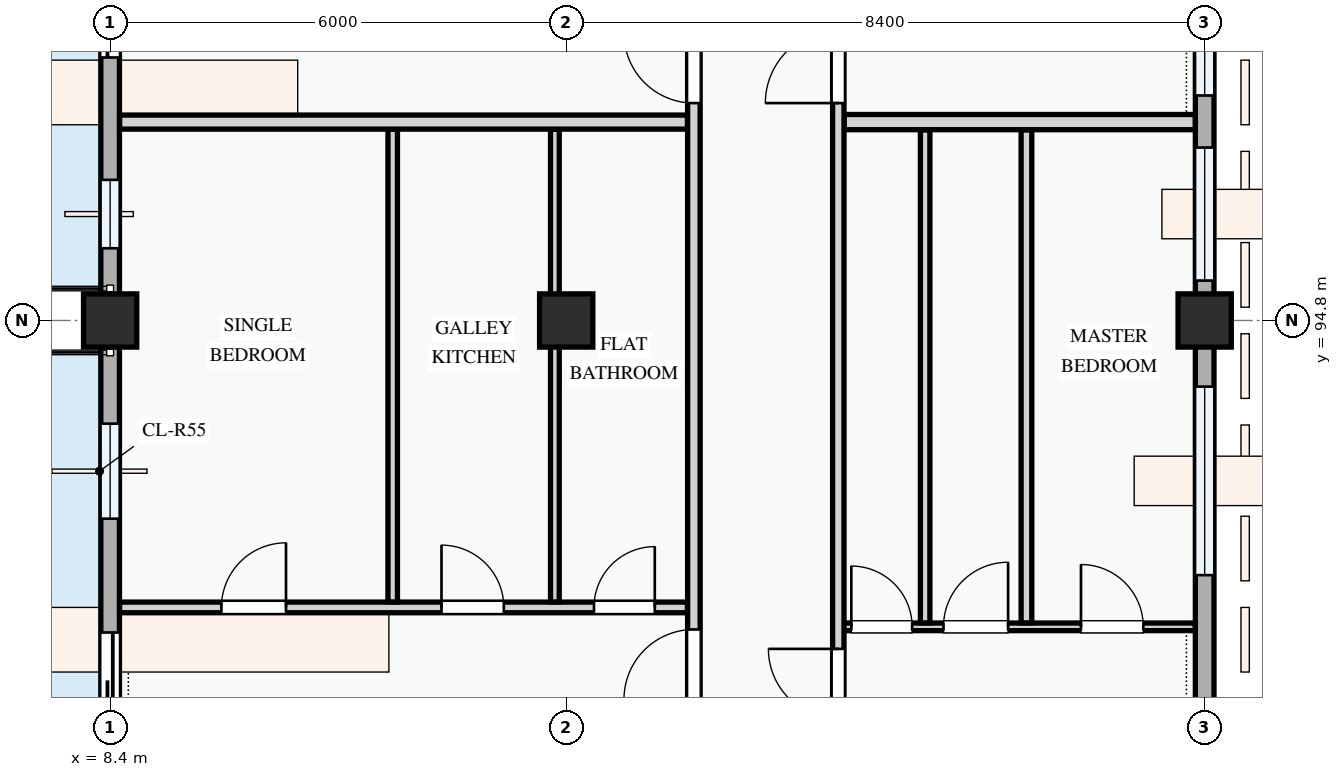
"""IFC4 building model, lengths in metres.
Left out: names, types, materials, properties, quantities, classifications, styles, units other than length and angle.
Written with IfcOpenShell. Run it as: python <this file> out.ifc"""

import sys

from ifc_helpers import new_model, si_unit, direction, frame, frame_2d, origin, origin_2d, place, context, subcontext, project, spatial, rectangle, extrude, element, fill, save


model = new_model("IFC4")
c1 = context("Model", 3, precision=1e-05, world=origin(), true_north=direction((0.0, 1.0)))
c2 = subcontext(c1, "Body", "Model", "MODEL_VIEW")
j1 = project(units=[si_unit("LENGTHUNIT", "METRE"), si_unit("PLANEANGLEUNIT", "RADIAN")], contexts=[c1])
p1 = place(None, origin())
s1 = spatial("IfcSite", under=j1, at=p1, CompositionType="ELEMENT")
p2 = place(p1, origin())
s2 = spatial("IfcBuilding", under=s1, at=p2, CompositionType="ELEMENT")
p3 = place(p2, frame((0.0, 0.0, 8.1)))
s3 = spatial("IfcBuildingStorey", under=s2, at=p3, CompositionType="ELEMENT", Elevation=8.1)
for number, where, z_axis, x_axis in (
    (1, (8.4, 94.8, 0.0), (0.0, 0.0, 1.0), (1.0, 0.0, 0.0)),
    (2, (14.4, 94.8, 0.0), (0.0, 0.0, 1.0), (1.0, 0.0, 0.0)),
    (3, (22.8, 94.8, 0.0), (0.0, 0.0, 1.0), (1.0, 0.0, 0.0)),
):
    element("IfcColumn", number, at=place(p3, frame(where, z_axis=z_axis, x_axis=x_axis)), inside=s3, PredefinedType="COLUMN", context=c2, shape_type="SweptSolid", body=[
        extrude(rectangle(XDim=0.7, YDim=0.7, at=origin_2d()), origin(), (0.0, 0.0, 1.0), 3.3),
    ])
p4 = place(p3, frame((8.4, 100.8, 0.0), z_axis=(0.0, 0.0, 1.0), x_axis=(0.0, -1.0, 0.0)))
e4 = element("IfcWall", 4, at=p4, inside=s3, PredefinedType="STANDARD", context=c2, shape_type="SweptSolid", body=[
    extrude(rectangle(XDim=6.0, YDim=0.245, at=frame_2d((3.0, 0.0))), origin(), (0.0, 0.0, 1.0), 2.445),
])
p5 = place(p4, frame((1.14, 0.0, 0.0)))
e5 = element("IfcOpeningElement", 5, at=p5, cuts=e4, PredefinedType="OPENING", context=c2, shape_type="SweptSolid", body=[
    extrude(rectangle(XDim=1.4, YDim=2.2, at=frame_2d((0.7, 1.1))), frame((0.0, 0.133, 0.0), z_axis=(0.0, -1.0, 0.0), x_axis=(1.0, 0.0, 0.0)), (0.0, 0.0, 1.0), 0.265),
])
p6 = place(p4, frame((4.15, 0.0, 0.78)))
e6 = element("IfcOpeningElement", 6, at=p6, cuts=e4, PredefinedType="OPENING", context=c2, shape_type="SweptSolid", body=[
    extrude(rectangle(XDim=0.9, YDim=1.2, at=frame_2d((0.45, 0.6))), frame((0.0, 0.133, 0.0), z_axis=(0.0, -1.0, 0.0), x_axis=(1.0, 0.0, 0.0)), (0.0, 0.0, 1.0), 0.265),
])
p7 = place(p3, frame((8.4, 94.8, 0.0), z_axis=(0.0, 0.0, 1.0), x_axis=(0.0, -1.0, 0.0)))
e7 = element("IfcWall", 7, at=p7, inside=s3, PredefinedType="STANDARD", context=c2, shape_type="SweptSolid", body=[
    extrude(rectangle(XDim=8.4, YDim=0.245, at=frame_2d((4.2, 0.0))), origin(), (0.0, 0.0, 1.0), 2.345),
])
p8 = place(p7, frame((4.105, 0.0, 0.0)))
e8 = element("IfcOpeningElement", 8, at=p8, cuts=e7, PredefinedType="OPENING", context=c2, shape_type="SweptSolid", body=[
    extrude(rectangle(XDim=1.5, YDim=2.2, at=frame_2d((0.75, 1.1))), frame((0.0, 0.133, 0.0), z_axis=(0.0, -1.0, 0.0), x_axis=(1.0, 0.0, 0.0)), (0.0, 0.0, 1.0), 0.265),
])
p9 = place(p7, frame((1.357, 0.0, 0.78)))
e9 = element("IfcOpeningElement", 9, at=p9, cuts=e7, PredefinedType="OPENING", context=c2, shape_type="SweptSolid", body=[
    extrude(rectangle(XDim=1.25, YDim=1.3, at=frame_2d((0.625, 0.65))), frame((0.0, 0.133, 0.0), z_axis=(0.0, -1.0, 0.0), x_axis=(1.0, 0.0, 0.0)), (0.0, 0.0, 1.0), 0.265),
])
p10 = place(p7, frame((6.022, 0.0, 0.78)))
e10 = element("IfcOpeningElement", 10, at=p10, cuts=e7, PredefinedType="OPENING", context=c2, shape_type="SweptSolid", body=[
    extrude(rectangle(XDim=1.82, YDim=1.46, at=frame_2d((0.91, 0.73))), frame((0.0, 0.133, 0.0), z_axis=(0.0, -1.0, 0.0), x_axis=(1.0, 0.0, 0.0)), (0.0, 0.0, 1.0), 0.265),
])
p11 = place(p3, frame((22.8, 86.4, 0.0), z_axis=(0.0, 0.0, 1.0), x_axis=(0.0, 1.0, 0.0)))
e11 = element("IfcWall", 11, at=p11, inside=s3, PredefinedType="STANDARD", context=c2, shape_type="SweptSolid", body=[
    extrude(rectangle(XDim=8.4, YDim=0.245, at=frame_2d((4.2, 0.0))), origin(), (0.0, 0.0, 1.0), 2.425),
])
p12 = place(p11, frame((1.16, 0.0, 0.78)))
e12 = element("IfcOpeningElement", 12, at=p12, cuts=e11, PredefinedType="OPENING", context=c2, shape_type="SweptSolid", body=[
    extrude(rectangle(XDim=2.24, YDim=1.52, at=frame_2d((1.12, 0.76))), frame((0.0, 0.133, 0.0), z_axis=(0.0, -1.0, 0.0), x_axis=(1.0, 0.0, 0.0)), (0.0, 0.0, 1.0), 0.265),
])
p13 = place(p11, frame((5.05, 0.0, 0.78)))
e13 = element("IfcOpeningElement", 13, at=p13, cuts=e11, PredefinedType="OPENING", context=c2, shape_type="SweptSolid", body=[
    extrude(rectangle(XDim=2.48, YDim=1.46, at=frame_2d((1.24, 0.73))), frame((0.0, 0.133, 0.0), z_axis=(0.0, -1.0, 0.0), x_axis=(1.0, 0.0, 0.0)), (0.0, 0.0, 1.0), 0.265),
])
p14 = place(p3, frame((22.8, 94.8, 0.0), z_axis=(0.0, 0.0, 1.0), x_axis=(0.0, 1.0, 0.0)))
e14 = element("IfcWall", 14, at=p14, inside=s3, PredefinedType="STANDARD", context=c2, shape_type="SweptSolid", body=[
    extrude(rectangle(XDim=6.0, YDim=0.245, at=frame_2d((3.0, 0.0))), origin(), (0.0, 0.0, 1.0), 2.575),
])
p15 = place(p14, frame((0.525, 0.0, 0.78)))
e15 = element("IfcOpeningElement", 15, at=p15, cuts=e14, PredefinedType="OPENING", context=c2, shape_type="SweptSolid", body=[
    extrude(rectangle(XDim=1.75, YDim=1.45, at=frame_2d((0.875, 0.725))), frame((0.0, 0.133, 0.0), z_axis=(0.0, -1.0, 0.0), x_axis=(1.0, 0.0, 0.0)), (0.0, 0.0, 1.0), 0.265),
])
p16 = place(p14, frame((2.96, 0.0, 0.78)))
e16 = element("IfcOpeningElement", 16, at=p16, cuts=e14, PredefinedType="OPENING", context=c2, shape_type="SweptSolid", body=[
    extrude(rectangle(XDim=2.5, YDim=1.6, at=frame_2d((1.25, 0.8))), frame((0.0, 0.133, 0.0), z_axis=(0.0, -1.0, 0.0), x_axis=(1.0, 0.0, 0.0)), (0.0, 0.0, 1.0), 0.265),
])
p17 = place(p3, frame((8.524, 91.025, 0.0), z_axis=(0.0, 0.0, 1.0), x_axis=(1.0, 0.0, 0.0)))
e17 = element("IfcWall", 17, at=p17, inside=s3, PredefinedType="PARTITIONING", context=c2, shape_type="SweptSolid", body=[
    extrude(rectangle(XDim=7.471, YDim=0.14, at=frame_2d((3.736, 0.0))), origin(), (0.0, 0.0, 1.0), 3.0),
])
p18 = place(p17, frame((1.339, 0.0, 0.0)))
e18 = element("IfcOpeningElement", 18, at=p18, cuts=e17, PredefinedType="OPENING", context=c2, shape_type="SweptSolid", body=[
    extrude(rectangle(XDim=0.85, YDim=2.1, at=frame_2d((0.425, 1.05))), frame((0.0, 0.08, 0.0), z_axis=(0.0, -1.0, 0.0), x_axis=(1.0, 0.0, 0.0)), (0.0, 0.0, 1.0), 0.16),
])
p19 = place(p17, frame((4.235, 0.0, 0.0)))
e19 = element("IfcOpeningElement", 19, at=p19, cuts=e17, PredefinedType="OPENING", context=c2, shape_type="SweptSolid", body=[
    extrude(rectangle(XDim=0.82, YDim=2.08, at=frame_2d((0.41, 1.04))), frame((0.0, 0.08, 0.0), z_axis=(0.0, -1.0, 0.0), x_axis=(1.0, 0.0, 0.0)), (0.0, 0.0, 1.0), 0.16),
])
p20 = place(p17, frame((6.241, 0.0, 0.0)))
e20 = element("IfcOpeningElement", 20, at=p20, cuts=e17, PredefinedType="OPENING", context=c2, shape_type="SweptSolid", body=[
    extrude(rectangle(XDim=0.8, YDim=2.1, at=frame_2d((0.4, 1.05))), frame((0.0, 0.08, 0.0), z_axis=(0.0, -1.0, 0.0), x_axis=(1.0, 0.0, 0.0)), (0.0, 0.0, 1.0), 0.16),
])
p21 = place(p3, frame((12.118, 91.097, 0.0), z_axis=(0.0, 0.0, 1.0), x_axis=(0.0, 1.0, 0.0)))
e21 = element("IfcWall", 21, at=p21, inside=s3, PredefinedType="PARTITIONING", context=c2, shape_type="SweptSolid", body=[
    extrude(rectangle(XDim=6.219, YDim=0.125, at=frame_2d((3.109, 0.0))), origin(), (0.0, 0.0, 1.0), 3.0),
])
p22 = place(p3, frame((14.251, 91.097, 0.0), z_axis=(0.0, 0.0, 1.0), x_axis=(0.0, 1.0, 0.0)))
e22 = element("IfcWall", 22, at=p22, inside=s3, PredefinedType="PARTITIONING", context=c2, shape_type="SweptSolid", body=[
    extrude(rectangle(XDim=6.219, YDim=0.115, at=frame_2d((3.109, 0.0))), origin(), (0.0, 0.0, 1.0), 2.425),
])
p23 = place(p3, frame((17.98, 90.77, 0.0), z_axis=(0.0, 0.0, 1.0), x_axis=(1.0, 0.0, 0.0)))
e23 = element("IfcWall", 23, at=p23, inside=s3, PredefinedType="PARTITIONING", context=c2, shape_type="SweptSolid", body=[
    extrude(rectangle(XDim=4.696, YDim=0.1, at=frame_2d((2.348, 0.0))), origin(), (0.0, 0.0, 1.0), 3.0),
])
p24 = place(p23, frame((0.171, 0.0, 0.0)))
e24 = element("IfcOpeningElement", 24, at=p24, cuts=e23, PredefinedType="OPENING", context=c2, shape_type="SweptSolid", body=[
    extrude(rectangle(XDim=0.8, YDim=2.1, at=frame_2d((0.4, 1.05))), frame((0.0, 0.06, 0.0), z_axis=(0.0, -1.0, 0.0), x_axis=(1.0, 0.0, 0.0)), (0.0, 0.0, 1.0), 0.12),
])
p25 = place(p23, frame((1.384, 0.0, 0.0)))
e25 = element("IfcOpeningElement", 25, at=p25, cuts=e23, PredefinedType="OPENING", context=c2, shape_type="SweptSolid", body=[
    extrude(rectangle(XDim=0.85, YDim=2.1, at=frame_2d((0.425, 1.05))), frame((0.0, 0.06, 0.0), z_axis=(0.0, -1.0, 0.0), x_axis=(1.0, 0.0, 0.0)), (0.0, 0.0, 1.0), 0.12),
])
p26 = place(p23, frame((3.193, 0.0, 0.0)))
e26 = element("IfcOpeningElement", 26, at=p26, cuts=e23, PredefinedType="OPENING", context=c2, shape_type="SweptSolid", body=[
    extrude(rectangle(XDim=0.82, YDim=2.08, at=frame_2d((0.41, 1.04))), frame((0.0, 0.06, 0.0), z_axis=(0.0, -1.0, 0.0), x_axis=(1.0, 0.0, 0.0)), (0.0, 0.0, 1.0), 0.12),
])
p27 = place(p3, frame((20.455, 90.822, 0.0), z_axis=(0.0, 0.0, 1.0), x_axis=(0.0, 1.0, 0.0)))
e27 = element("IfcWall", 27, at=p27, inside=s3, PredefinedType="PARTITIONING", context=c2, shape_type="SweptSolid", body=[
    extrude(rectangle(XDim=6.487, YDim=0.14, at=frame_2d((3.243, 0.0))), origin(), (0.0, 0.0, 1.0), 3.0),
])
p28 = place(p3, frame((19.122, 90.822, 0.0), z_axis=(0.0, 0.0, 1.0), x_axis=(0.0, 1.0, 0.0)))
e28 = element("IfcWall", 28, at=p28, inside=s3, PredefinedType="PARTITIONING", context=c2, shape_type="SweptSolid", body=[
    extrude(rectangle(XDim=6.487, YDim=0.125, at=frame_2d((3.243, 0.0))), origin(), (0.0, 0.0, 1.0), 3.0),
])
p29 = place(p3, frame((8.524, 97.41, 0.0), z_axis=(0.0, 0.0, 1.0), x_axis=(1.0, 0.0, 0.0)))
e29 = element("IfcWall", 29, at=p29, inside=s3, PredefinedType="PARTITIONING", context=c2, shape_type="SweptSolid", body=[
    extrude(rectangle(XDim=7.471, YDim=0.185, at=frame_2d((3.736, 0.0))), origin(), (0.0, 0.0, 1.0), 3.0),
])
p30 = place(p3, frame((18.057, 97.41, 0.0), z_axis=(0.0, 0.0, 1.0), x_axis=(1.0, 0.0, 0.0)))
e30 = element("IfcWall", 30, at=p30, inside=s3, PredefinedType="PARTITIONING", context=c2, shape_type="SweptSolid", body=[
    extrude(rectangle(XDim=4.619, YDim=0.2, at=frame_2d((2.309, 0.0))), origin(), (0.0, 0.0, 1.0), 3.0),
])
p31 = place(p3, frame((16.08, 72.125, 0.0), z_axis=(0.0, 0.0, 1.0), x_axis=(0.0, 1.0, 0.0)))
e31 = element("IfcWall", 31, at=p31, inside=s3, PredefinedType="PARTITIONING", context=c2, shape_type="SweptSolid", body=[
    extrude(rectangle(XDim=37.216, YDim=0.165, at=frame_2d((18.608, 0.0))), origin(), (0.0, 0.0, 1.0), 3.0),
])
p32 = place(p31, frame((3.657, 0.0, 0.0)))
e32 = element("IfcOpeningElement", 32, at=p32, cuts=e31, PredefinedType="OPENING", context=c2, shape_type="SweptSolid", body=[
    extrude(rectangle(XDim=0.96, YDim=2.12, at=frame_2d((0.48, 1.06))), frame((0.0, 0.093, 0.0), z_axis=(0.0, -1.0, 0.0), x_axis=(1.0, 0.0, 0.0)), (0.0, 0.0, 1.0), 0.185),
])
p33 = place(p31, frame((17.69, 0.0, 0.0)))
e33 = element("IfcOpeningElement", 33, at=p33, cuts=e31, PredefinedType="OPENING", context=c2, shape_type="SweptSolid", body=[
    extrude(rectangle(XDim=0.92, YDim=2.1, at=frame_2d((0.46, 1.05))), frame((0.0, 0.093, 0.0), z_axis=(0.0, -1.0, 0.0), x_axis=(1.0, 0.0, 0.0)), (0.0, 0.0, 1.0), 0.185),
])
p34 = place(p31, frame((25.535, 0.0, 0.0)))
e34 = element("IfcOpeningElement", 34, at=p34, cuts=e31, PredefinedType="OPENING", context=c2, shape_type="SweptSolid", body=[
    extrude(rectangle(XDim=0.92, YDim=2.1, at=frame_2d((0.46, 1.05))), frame((0.0, 0.093, 0.0), z_axis=(0.0, -1.0, 0.0), x_axis=(1.0, 0.0, 0.0)), (0.0, 0.0, 1.0), 0.185),
])
p35 = place(p3, frame((17.98, 72.125, 0.0), z_axis=(0.0, 0.0, 1.0), x_axis=(0.0, 1.0, 0.0)))
e35 = element("IfcWall", 35, at=p35, inside=s3, PredefinedType="PARTITIONING", context=c2, shape_type="SweptSolid", body=[
    extrude(rectangle(XDim=37.216, YDim=0.15, at=frame_2d((18.608, 0.0))), origin(), (0.0, 0.0, 1.0), 3.0),
])
p36 = place(p35, frame((3.619, 0.0, 0.0)))
e36 = element("IfcOpeningElement", 36, at=p36, cuts=e35, PredefinedType="OPENING", context=c2, shape_type="SweptSolid", body=[
    extrude(rectangle(XDim=0.92, YDim=2.1, at=frame_2d((0.46, 1.05))), frame((0.0, 0.085, 0.0), z_axis=(0.0, -1.0, 0.0), x_axis=(1.0, 0.0, 0.0)), (0.0, 0.0, 1.0), 0.17),
])
p37 = place(p35, frame((17.435, 0.0, 0.0)))
e37 = element("IfcOpeningElement", 37, at=p37, cuts=e35, PredefinedType="OPENING", context=c2, shape_type="SweptSolid", body=[
    extrude(rectangle(XDim=0.92, YDim=2.1, at=frame_2d((0.46, 1.05))), frame((0.0, 0.085, 0.0), z_axis=(0.0, -1.0, 0.0), x_axis=(1.0, 0.0, 0.0)), (0.0, 0.0, 1.0), 0.17),
])
p38 = place(p35, frame((25.535, 0.0, 0.0)))
e38 = element("IfcOpeningElement", 38, at=p38, cuts=e35, PredefinedType="OPENING", context=c2, shape_type="SweptSolid", body=[
    extrude(rectangle(XDim=0.96, YDim=2.12, at=frame_2d((0.48, 1.06))), frame((0.0, 0.085, 0.0), z_axis=(0.0, -1.0, 0.0), x_axis=(1.0, 0.0, 0.0)), (0.0, 0.0, 1.0), 0.17),
])
p39 = place(p5, frame((1.4, 0.0, 0.0), z_axis=(0.0, 0.0, 1.0), x_axis=(-1.0, 0.0, 0.0)))
e39 = element("IfcDoor", 39, at=p39, inside=s3, OperationType="SLIDING_TO_LEFT", PredefinedType="DOOR", context=c2, shape_type="SweptSolid", body=[
    extrude(rectangle(XDim=1.4, YDim=2.2, at=frame_2d((0.7, 1.1))), frame((0.0, 0.025, 0.0), z_axis=(0.0, -1.0, 0.0), x_axis=(1.0, 0.0, 0.0)), (0.0, 0.0, 1.0), 0.05),
])
fill(e5, e39)
p40 = place(p6, origin())
e40 = element("IfcWindow", 40, at=p40, inside=s3, PartitioningType="SINGLE_PANEL", PredefinedType="WINDOW", context=c2, shape_type="SweptSolid", body=[
    extrude(rectangle(XDim=0.9, YDim=1.2, at=frame_2d((0.45, 0.6))), frame((0.0, 0.03, 0.0), z_axis=(0.0, -1.0, 0.0), x_axis=(1.0, 0.0, 0.0)), (0.0, 0.0, 1.0), 0.06),
])
fill(e6, e40)
p41 = place(p8, frame((1.5, 0.0, 0.0), z_axis=(0.0, 0.0, 1.0), x_axis=(-1.0, 0.0, 0.0)))
e41 = element("IfcDoor", 41, at=p41, inside=s3, OperationType="SLIDING_TO_RIGHT", PredefinedType="DOOR", context=c2, shape_type="SweptSolid", body=[
    extrude(rectangle(XDim=1.5, YDim=2.2, at=frame_2d((0.75, 1.1))), frame((0.0, 0.025, 0.0), z_axis=(0.0, -1.0, 0.0), x_axis=(1.0, 0.0, 0.0)), (0.0, 0.0, 1.0), 0.05),
])
fill(e8, e41)
p42 = place(p9, origin())
e42 = element("IfcWindow", 42, at=p42, inside=s3, PartitioningType="SINGLE_PANEL", PredefinedType="WINDOW", context=c2, shape_type="SweptSolid", body=[
    extrude(rectangle(XDim=1.25, YDim=1.3, at=frame_2d((0.625, 0.65))), frame((0.0, 0.03, 0.0), z_axis=(0.0, -1.0, 0.0), x_axis=(1.0, 0.0, 0.0)), (0.0, 0.0, 1.0), 0.06),
])
fill(e9, e42)
p43 = place(p13, origin())
e43 = element("IfcWindow", 43, at=p43, inside=s3, PartitioningType="DOUBLE_PANEL_VERTICAL", PredefinedType="WINDOW", context=c2, shape_type="SweptSolid", body=[
    extrude(rectangle(XDim=2.48, YDim=1.46, at=frame_2d((1.24, 0.73))), frame((0.0, 0.03, 0.0), z_axis=(0.0, -1.0, 0.0), x_axis=(1.0, 0.0, 0.0)), (0.0, 0.0, 1.0), 0.06),
])
fill(e13, e43)
p44 = place(p15, origin())
e44 = element("IfcWindow", 44, at=p44, inside=s3, PartitioningType="DOUBLE_PANEL_VERTICAL", PredefinedType="WINDOW", context=c2, shape_type="SweptSolid", body=[
    extrude(rectangle(XDim=1.75, YDim=1.45, at=frame_2d((0.875, 0.725))), frame((0.0, 0.03, 0.0), z_axis=(0.0, -1.0, 0.0), x_axis=(1.0, 0.0, 0.0)), (0.0, 0.0, 1.0), 0.06),
])
fill(e15, e44)
p45 = place(p16, origin())
e45 = element("IfcWindow", 45, at=p45, inside=s3, PartitioningType="DOUBLE_PANEL_VERTICAL", PredefinedType="WINDOW", context=c2, shape_type="SweptSolid", body=[
    extrude(rectangle(XDim=2.5, YDim=1.6, at=frame_2d((1.25, 0.8))), frame((0.0, 0.03, 0.0), z_axis=(0.0, -1.0, 0.0), x_axis=(1.0, 0.0, 0.0)), (0.0, 0.0, 1.0), 0.06),
])
fill(e16, e45)
p46 = place(p18, origin())
e46 = element("IfcDoor", 46, at=p46, inside=s3, OperationType="SINGLE_SWING_RIGHT", PredefinedType="DOOR", context=c2, shape_type="SweptSolid", body=[
    extrude(rectangle(XDim=0.85, YDim=2.1, at=frame_2d((0.425, 1.05))), frame((0.0, 0.025, 0.0), z_axis=(0.0, -1.0, 0.0), x_axis=(1.0, 0.0, 0.0)), (0.0, 0.0, 1.0), 0.05),
])
fill(e18, e46)
p47 = place(p19, origin())
e47 = element("IfcDoor", 47, at=p47, inside=s3, OperationType="SINGLE_SWING_LEFT", PredefinedType="DOOR", context=c2, shape_type="SweptSolid", body=[
    extrude(rectangle(XDim=0.82, YDim=2.08, at=frame_2d((0.41, 1.04))), frame((0.0, 0.025, 0.0), z_axis=(0.0, -1.0, 0.0), x_axis=(1.0, 0.0, 0.0)), (0.0, 0.0, 1.0), 0.05),
])
fill(e19, e47)
p48 = place(p20, origin())
e48 = element("IfcDoor", 48, at=p48, inside=s3, OperationType="SINGLE_SWING_RIGHT", PredefinedType="DOOR", context=c2, shape_type="SweptSolid", body=[
    extrude(rectangle(XDim=0.8, YDim=2.1, at=frame_2d((0.4, 1.05))), frame((0.0, 0.025, 0.0), z_axis=(0.0, -1.0, 0.0), x_axis=(1.0, 0.0, 0.0)), (0.0, 0.0, 1.0), 0.05),
])
fill(e20, e48)
p49 = place(p24, origin())
e49 = element("IfcDoor", 49, at=p49, inside=s3, OperationType="SINGLE_SWING_LEFT", PredefinedType="DOOR", context=c2, shape_type="SweptSolid", body=[
    extrude(rectangle(XDim=0.8, YDim=2.1, at=frame_2d((0.4, 1.05))), frame((0.0, 0.025, 0.0), z_axis=(0.0, -1.0, 0.0), x_axis=(1.0, 0.0, 0.0)), (0.0, 0.0, 1.0), 0.05),
])
fill(e24, e49)
p50 = place(p25, origin())
e50 = element("IfcDoor", 50, at=p50, inside=s3, OperationType="SINGLE_SWING_RIGHT", PredefinedType="DOOR", context=c2, shape_type="SweptSolid", body=[
    extrude(rectangle(XDim=0.85, YDim=2.1, at=frame_2d((0.425, 1.05))), frame((0.0, 0.025, 0.0), z_axis=(0.0, -1.0, 0.0), x_axis=(1.0, 0.0, 0.0)), (0.0, 0.0, 1.0), 0.05),
])
fill(e25, e50)
p51 = place(p26, origin())
e51 = element("IfcDoor", 51, at=p51, inside=s3, OperationType="SINGLE_SWING_LEFT", PredefinedType="DOOR", context=c2, shape_type="SweptSolid", body=[
    extrude(rectangle(XDim=0.82, YDim=2.08, at=frame_2d((0.41, 1.04))), frame((0.0, 0.025, 0.0), z_axis=(0.0, -1.0, 0.0), x_axis=(1.0, 0.0, 0.0)), (0.0, 0.0, 1.0), 0.05),
])
fill(e26, e51)
p52 = place(p33, origin())
e52 = element("IfcDoor", 52, at=p52, inside=s3, OperationType="SINGLE_SWING_LEFT", PredefinedType="DOOR", context=c2, shape_type="SweptSolid", body=[
    extrude(rectangle(XDim=0.92, YDim=2.1, at=frame_2d((0.46, 1.05))), frame((0.0, 0.025, 0.0), z_axis=(0.0, -1.0, 0.0), x_axis=(1.0, 0.0, 0.0)), (0.0, 0.0, 1.0), 0.05),
])
fill(e33, e52)
p53 = place(p34, origin())
e53 = element("IfcDoor", 53, at=p53, inside=s3, OperationType="SINGLE_SWING_RIGHT", PredefinedType="DOOR", context=c2, shape_type="SweptSolid", body=[
    extrude(rectangle(XDim=0.92, YDim=2.1, at=frame_2d((0.46, 1.05))), frame((0.0, 0.025, 0.0), z_axis=(0.0, -1.0, 0.0), x_axis=(1.0, 0.0, 0.0)), (0.0, 0.0, 1.0), 0.05),
])
fill(e34, e53)
p54 = place(p37, origin())
e54 = element("IfcDoor", 54, at=p54, inside=s3, OperationType="SINGLE_SWING_RIGHT", PredefinedType="DOOR", context=c2, shape_type="SweptSolid", body=[
    extrude(rectangle(XDim=0.92, YDim=2.1, at=frame_2d((0.46, 1.05))), frame((0.0, 0.025, 0.0), z_axis=(0.0, -1.0, 0.0), x_axis=(1.0, 0.0, 0.0)), (0.0, 0.0, 1.0), 0.05),
])
fill(e37, e54)
p55 = place(p38, origin())
e55 = element("IfcDoor", 55, at=p55, inside=s3, OperationType="SINGLE_SWING_LEFT", PredefinedType="DOOR", context=c2, shape_type="SweptSolid", body=[
    extrude(rectangle(XDim=0.96, YDim=2.12, at=frame_2d((0.48, 1.06))), frame((0.0, 0.025, 0.0), z_axis=(0.0, -1.0, 0.0), x_axis=(1.0, 0.0, 0.0)), (0.0, 0.0, 1.0), 0.05),
])
fill(e38, e55)
save(model, sys.argv[1])
